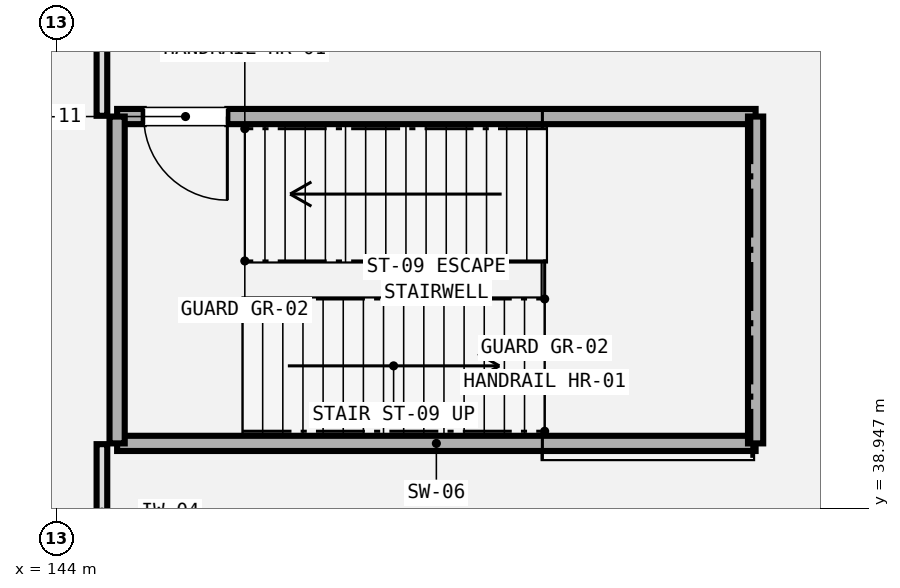
"""IFC4 building model, lengths in metres.
Left out: names, types, materials, properties, quantities, classifications, styles, units other than length and angle.
Written with IfcOpenShell. Run it as: python <this file> out.ifc"""

import sys

from ifc_helpers import new_model, si_unit, direction, frame, frame_2d, origin, place, context, subcontext, project, spatial, rectangle, extrude, element, fill, save


model = new_model("IFC4")
c1 = context("Model", 3, precision=1e-05, world=origin(), true_north=direction((0.0, 1.0)))
c2 = subcontext(c1, "Body", "Model", "MODEL_VIEW")
j1 = project(units=[si_unit("LENGTHUNIT", "METRE"), si_unit("PLANEANGLEUNIT", "RADIAN")], contexts=[c1])
p1 = place(None, origin())
s1 = spatial("IfcSite", under=j1, at=p1, CompositionType="ELEMENT")
p2 = place(p1, origin())
s2 = spatial("IfcBuilding", under=s1, at=p2, CompositionType="ELEMENT")
p3 = place(p2, frame((0.0, 0.0, -5.4)))
s3 = spatial("IfcBuildingStorey", under=s2, at=p3, CompositionType="ELEMENT", Elevation=-5.4)
p4 = place(p3, frame((144.8, 39.8, -0.15), z_axis=(0.0, 0.0, 1.0), x_axis=(1.0, 0.0, 0.0)))
e1 = element("IfcWall", 1, at=p4, inside=s3, PredefinedType="SHEAR", context=c2, shape_type="SweptSolid", body=[
    extrude(rectangle(XDim=8.4, YDim=0.2, at=frame_2d((4.2, 0.0))), origin(), (0.0, 0.0, 1.0), 5.13),
])
p5 = place(p3, frame((144.8, 44.1, -0.15), z_axis=(0.0, 0.0, 1.0), x_axis=(1.0, 0.0, 0.0)))
e2 = element("IfcWall", 2, at=p5, inside=s3, PredefinedType="SHEAR", context=c2, shape_type="SweptSolid", body=[
    extrude(rectangle(XDim=8.4, YDim=0.2, at=frame_2d((4.2, 0.0))), origin(), (0.0, 0.0, 1.0), 5.13),
])
p6 = place(p5, frame((0.35, 0.0, 0.15)))
e3 = element("IfcOpeningElement", 3, at=p6, cuts=e2, PredefinedType="OPENING", context=c2, shape_type="SweptSolid", body=[
    extrude(rectangle(XDim=1.1, YDim=2.2, at=frame_2d((0.55, 1.1))), frame((0.0, 0.11, 0.0), z_axis=(0.0, -1.0, 0.0), x_axis=(1.0, 0.0, 0.0)), (0.0, 0.0, 1.0), 0.22),
])
for number, where, z_axis, x_axis in (
    (4, (144.8, 39.8, -0.15), (0.0, 0.0, 1.0), (0.0, 1.0, 0.0)),
    (5, (153.2, 39.8, -0.15), (0.0, 0.0, 1.0), (0.0, 1.0, 0.0)),
):
    element("IfcWall", number, at=place(p3, frame(where, z_axis=z_axis, x_axis=x_axis)), inside=s3, PredefinedType="SHEAR", context=c2, shape_type="SweptSolid", body=[
        extrude(rectangle(XDim=4.3, YDim=0.2, at=frame_2d((2.15, 0.0))), origin(), (0.0, 0.0, 1.0), 5.13),
    ])
p7 = place(p3, frame((144.6, 38.0, 0.0), z_axis=(0.0, 0.0, 1.0), x_axis=(0.0, 1.0, 0.0)))
e6 = element("IfcWall", 6, at=p7, inside=s3, PredefinedType="PARTITIONING", context=c2, shape_type="SweptSolid", body=[
    extrude(rectangle(XDim=1.79, YDim=0.14, at=frame_2d((0.895, 0.0))), origin(), (0.0, 0.0, 1.0), 3.8),
])
p8 = place(p3, frame((144.6, 44.11, 0.0), z_axis=(0.0, 0.0, 1.0), x_axis=(0.0, 1.0, 0.0)))
e7 = element("IfcWall", 7, at=p8, inside=s3, PredefinedType="PARTITIONING", context=c2, shape_type="SweptSolid", body=[
    extrude(rectangle(XDim=2.49, YDim=0.14, at=frame_2d((1.245, 0.0))), origin(), (0.0, 0.0, 1.0), 3.8),
])
p9 = place(p6, frame((1.1, 0.0, 0.0), z_axis=(0.0, 0.0, 1.0), x_axis=(-1.0, 0.0, 0.0)))
e8 = element("IfcDoor", 8, at=p9, inside=s3, OperationType="SINGLE_SWING_LEFT", PredefinedType="DOOR", context=c2, shape_type="SweptSolid", body=[
    extrude(rectangle(XDim=1.1, YDim=2.2, at=frame_2d((0.55, 1.1))), frame((0.0, 0.025, 0.0), z_axis=(0.0, -1.0, 0.0), x_axis=(1.0, 0.0, 0.0)), (0.0, 0.0, 1.0), 0.05),
])
fill(e3, e8)
save(model, sys.argv[1])
